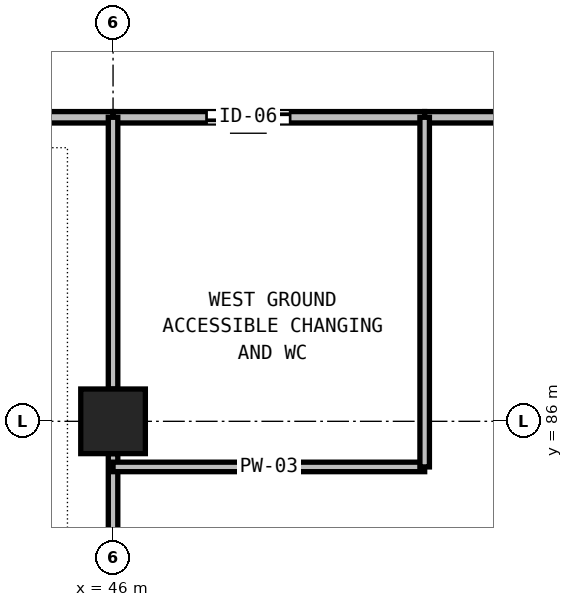
"""IFC4 building model, lengths in metres.
Left out: names, types, materials, properties, quantities, classifications, styles, units other than length and angle.
Written with IfcOpenShell. Run it as: python <this file> out.ifc"""

import sys

from ifc_helpers import new_model, si_unit, direction, frame, frame_2d, origin, origin_2d, place, context, subcontext, project, spatial, rectangle, extrude, element, fill, save


model = new_model("IFC4")
c1 = context("Model", 3, precision=1e-05, world=origin(), true_north=direction((0.0, 1.0)))
c2 = subcontext(c1, "Body", "Model", "MODEL_VIEW")
j1 = project(units=[si_unit("LENGTHUNIT", "METRE"), si_unit("PLANEANGLEUNIT", "RADIAN")], contexts=[c1])
p1 = place(None, origin())
s1 = spatial("IfcSite", under=j1, at=p1, CompositionType="ELEMENT")
p2 = place(p1, origin())
s2 = spatial("IfcBuilding", under=s1, at=p2, CompositionType="ELEMENT")
p3 = place(p2, origin())
s3 = spatial("IfcBuildingStorey", under=s2, at=p3, CompositionType="ELEMENT", Elevation=0.0)
p4 = place(p3, frame((46.0, 86.0, 0.0), z_axis=(0.0, 0.0, 1.0), x_axis=(1.0, 0.0, 0.0)))
e1 = element("IfcColumn", 1, at=p4, inside=s3, PredefinedType="COLUMN", context=c2, shape_type="SweptSolid", body=[
    extrude(rectangle(XDim=0.85, YDim=0.85, at=origin_2d()), origin(), (0.0, 0.0, 1.0), 5.4),
])
p5 = place(p3, frame((26.0, 90.0, 0.0), z_axis=(0.0, 0.0, 1.0), x_axis=(1.0, 0.0, 0.0)))
e2 = element("IfcWall", 2, at=p5, inside=s3, PredefinedType="PARTITIONING", context=c2, shape_type="SweptSolid", body=[
    extrude(rectangle(XDim=20.0, YDim=0.15, at=frame_2d((10.0, 0.0))), origin(), (0.0, 0.0, 1.0), 5.1),
])
p6 = place(p5, frame((9.0, 0.0, 0.0)))
e3 = element("IfcOpeningElement", 3, at=p6, cuts=e2, PredefinedType="OPENING", context=c2, shape_type="SweptSolid", body=[
    extrude(rectangle(XDim=1.5, YDim=2.2, at=frame_2d((0.75, 1.1))), frame((0.0, 0.085, 0.0), z_axis=(0.0, -1.0, 0.0), x_axis=(1.0, 0.0, 0.0)), (0.0, 0.0, 1.0), 0.17),
])
p7 = place(p3, frame((46.0, 90.0, 0.0), z_axis=(0.0, 0.0, 1.0), x_axis=(1.0, 0.0, 0.0)))
e4 = element("IfcWall", 4, at=p7, inside=s3, PredefinedType="PARTITIONING", context=c2, shape_type="SweptSolid", body=[
    extrude(rectangle(XDim=4.1, YDim=0.15, at=frame_2d((2.05, 0.0))), origin(), (0.0, 0.0, 1.0), 5.1),
])
p8 = place(p7, frame((1.23, 0.0, 0.0)))
e5 = element("IfcOpeningElement", 5, at=p8, cuts=e4, PredefinedType="OPENING", context=c2, shape_type="SweptSolid", body=[
    extrude(rectangle(XDim=1.1, YDim=2.15, at=frame_2d((0.55, 1.075))), frame((0.0, 0.085, 0.0), z_axis=(0.0, -1.0, 0.0), x_axis=(1.0, 0.0, 0.0)), (0.0, 0.0, 1.0), 0.17),
])
p9 = place(p3, frame((50.1, 90.0, 0.0), z_axis=(0.0, 0.0, 1.0), x_axis=(1.0, 0.0, 0.0)))
e6 = element("IfcWall", 6, at=p9, inside=s3, PredefinedType="PARTITIONING", context=c2, shape_type="SweptSolid", body=[
    extrude(rectangle(XDim=3.9, YDim=0.15, at=frame_2d((1.95, 0.0))), origin(), (0.0, 0.0, 1.0), 5.1),
])
p10 = place(p9, frame((1.17, 0.0, 0.0)))
e7 = element("IfcOpeningElement", 7, at=p10, cuts=e6, PredefinedType="OPENING", context=c2, shape_type="SweptSolid", body=[
    extrude(rectangle(XDim=0.95, YDim=2.1, at=frame_2d((0.475, 1.05))), frame((0.0, 0.085, 0.0), z_axis=(0.0, -1.0, 0.0), x_axis=(1.0, 0.0, 0.0)), (0.0, 0.0, 1.0), 0.17),
])
p11 = place(p3, frame((46.0, 78.4, 0.0), z_axis=(0.0, 0.0, 1.0), x_axis=(0.0, 1.0, 0.0)))
e8 = element("IfcWall", 8, at=p11, inside=s3, PredefinedType="PARTITIONING", context=c2, shape_type="SweptSolid", body=[
    extrude(rectangle(XDim=7.175, YDim=0.125, at=frame_2d((3.587, 0.0))), origin(), (0.0, 0.0, 1.0), 4.42),
])
p12 = place(p3, frame((46.0, 86.425, 0.0), z_axis=(0.0, 0.0, 1.0), x_axis=(0.0, 1.0, 0.0)))
e9 = element("IfcWall", 9, at=p12, inside=s3, PredefinedType="PARTITIONING", context=c2, shape_type="SweptSolid", body=[
    extrude(rectangle(XDim=3.575, YDim=0.125, at=frame_2d((1.788, 0.0))), origin(), (0.0, 0.0, 1.0), 4.36),
])
p13 = place(p3, frame((46.0, 85.4, 0.0), z_axis=(0.0, 0.0, 1.0), x_axis=(1.0, 0.0, 0.0)))
e10 = element("IfcWall", 10, at=p13, inside=s3, PredefinedType="PARTITIONING", context=c2, shape_type="SweptSolid", body=[
    extrude(rectangle(XDim=4.1, YDim=0.125, at=frame_2d((2.05, 0.0))), origin(), (0.0, 0.0, 1.0), 5.1),
])
p14 = place(p3, frame((50.1, 85.4, 0.0), z_axis=(0.0, 0.0, 1.0), x_axis=(0.0, 1.0, 0.0)))
e11 = element("IfcWall", 11, at=p14, inside=s3, PredefinedType="PARTITIONING", context=c2, shape_type="SweptSolid", body=[
    extrude(rectangle(XDim=4.6, YDim=0.125, at=frame_2d((2.3, 0.0))), origin(), (0.0, 0.0, 1.0), 5.1),
])
p15 = place(p8, frame((1.1, 0.0, 0.0), z_axis=(0.0, 0.0, 1.0), x_axis=(-1.0, 0.0, 0.0)))
e12 = element("IfcDoor", 12, at=p15, inside=s3, OperationType="SLIDING_TO_RIGHT", PredefinedType="DOOR", context=c2, shape_type="SweptSolid", body=[
    extrude(rectangle(XDim=1.1, YDim=2.15, at=frame_2d((0.55, 1.075))), frame((0.0, 0.025, 0.0), z_axis=(0.0, -1.0, 0.0), x_axis=(1.0, 0.0, 0.0)), (0.0, 0.0, 1.0), 0.05),
])
fill(e5, e12)
save(model, sys.argv[1])
